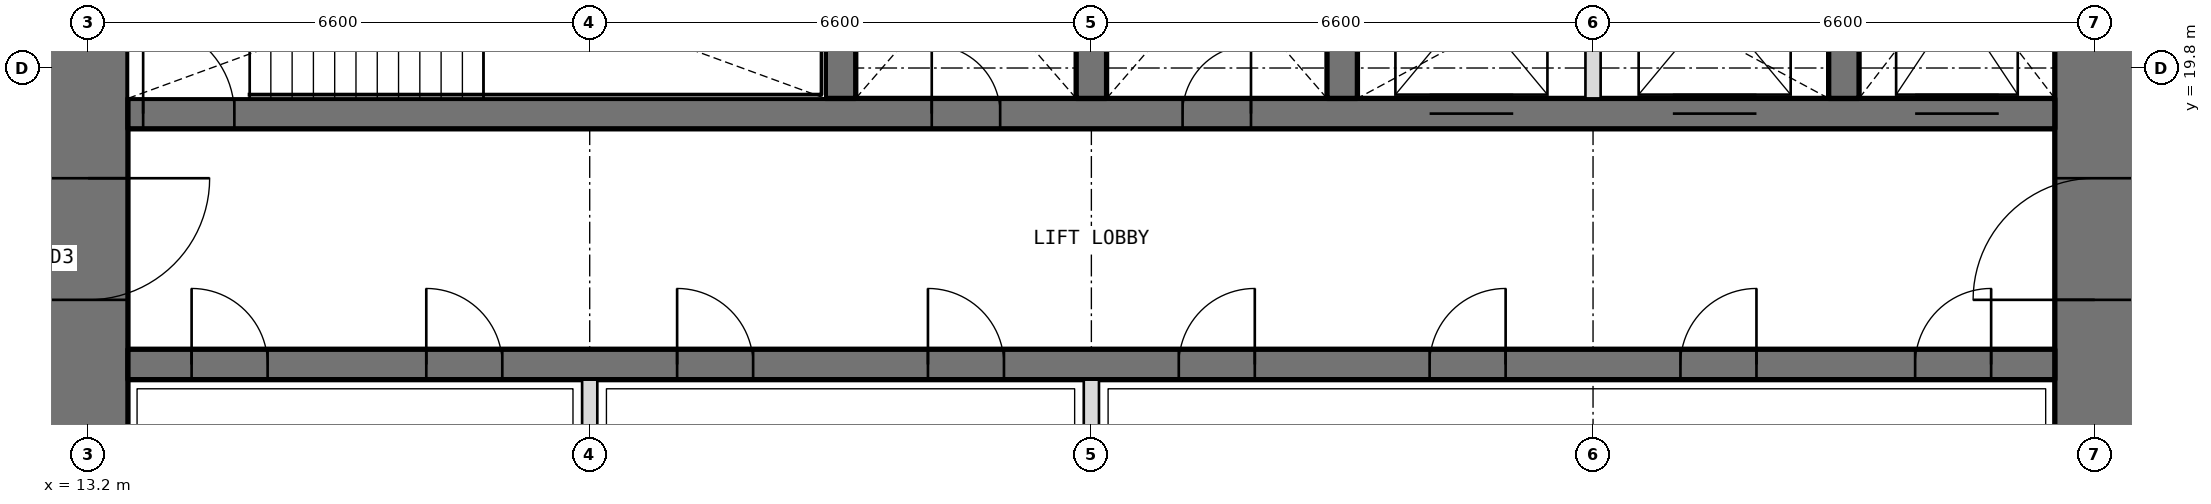
"""IFC4 building model, lengths in metres.
Left out: names, types, materials, properties, quantities, classifications, styles, units other than length and angle.
Written with IfcOpenShell. Run it as: python <this file> out.ifc"""

import sys

from ifc_helpers import new_model, si_unit, direction, frame, frame_2d, origin, place, context, subcontext, project, spatial, rectangle, extrude, element, fill, save


model = new_model("IFC4")
c1 = context("Model", 3, precision=1e-05, world=origin(), true_north=direction((0.0, 1.0)))
c2 = subcontext(c1, "Body", "Model", "MODEL_VIEW")
j1 = project(units=[si_unit("LENGTHUNIT", "METRE"), si_unit("PLANEANGLEUNIT", "RADIAN")], contexts=[c1])
p1 = place(None, origin())
s1 = spatial("IfcSite", under=j1, at=p1, CompositionType="ELEMENT")
p2 = place(p1, origin())
s2 = spatial("IfcBuilding", under=s1, at=p2, CompositionType="ELEMENT")
p3 = place(p2, frame((0.0, 0.0, 241.8)))
s3 = spatial("IfcBuildingStorey", under=s2, at=p3, CompositionType="ELEMENT", Elevation=241.8)
p4 = place(p3, frame((39.6, 13.725, 0.0), z_axis=(0.0, 0.0, 1.0), x_axis=(0.0, 1.0, 0.0)))
e1 = element("IfcWall", 1, at=p4, inside=s3, PredefinedType="SHEAR", context=c2, shape_type="SweptSolid", body=[
    extrude(rectangle(XDim=18.75, YDim=1.05, at=frame_2d((9.375, 0.0))), origin(), (0.0, 0.0, 1.0), 4.2),
])
p5 = place(p4, frame((3.025, 0.0, 0.0)))
e2 = element("IfcOpeningElement", 2, at=p5, cuts=e1, PredefinedType="OPENING", context=c2, shape_type="SweptSolid", body=[
    extrude(rectangle(XDim=1.6, YDim=2.1, at=frame_2d((0.8, 1.05))), frame((0.0, 0.535, 0.0), z_axis=(0.0, -1.0, 0.0), x_axis=(1.0, 0.0, 0.0)), (0.0, 0.0, 1.0), 1.07),
])
p6 = place(p4, frame((13.825, 0.0, 0.0)))
e3 = element("IfcOpeningElement", 3, at=p6, cuts=e1, PredefinedType="OPENING", context=c2, shape_type="SweptSolid", body=[
    extrude(rectangle(XDim=1.6, YDim=2.1, at=frame_2d((0.8, 1.05))), frame((0.0, 0.535, 0.0), z_axis=(0.0, -1.0, 0.0), x_axis=(1.0, 0.0, 0.0)), (0.0, 0.0, 1.0), 1.07),
])
p7 = place(p3, frame((13.2, 32.475, 0.0), z_axis=(0.0, 0.0, 1.0), x_axis=(0.0, -1.0, 0.0)))
e4 = element("IfcWall", 4, at=p7, inside=s3, PredefinedType="SHEAR", context=c2, shape_type="SweptSolid", body=[
    extrude(rectangle(XDim=18.75, YDim=1.05, at=frame_2d((9.375, 0.0))), origin(), (0.0, 0.0, 1.0), 4.2),
])
p8 = place(p7, frame((14.125, 0.0, 0.0)))
e5 = element("IfcOpeningElement", 5, at=p8, cuts=e4, PredefinedType="OPENING", context=c2, shape_type="SweptSolid", body=[
    extrude(rectangle(XDim=1.6, YDim=2.1, at=frame_2d((0.8, 1.05))), frame((0.0, 0.535, 0.0), z_axis=(0.0, -1.0, 0.0), x_axis=(1.0, 0.0, 0.0)), (0.0, 0.0, 1.0), 1.07),
])
p9 = place(p7, frame((3.325, 0.0, 0.0)))
e6 = element("IfcOpeningElement", 6, at=p9, cuts=e4, PredefinedType="OPENING", context=c2, shape_type="SweptSolid", body=[
    extrude(rectangle(XDim=1.6, YDim=2.1, at=frame_2d((0.8, 1.05))), frame((0.0, 0.535, 0.0), z_axis=(0.0, -1.0, 0.0), x_axis=(1.0, 0.0, 0.0)), (0.0, 0.0, 1.0), 1.07),
])
p10 = place(p3, frame((13.725, 15.9, 0.0), z_axis=(0.0, 0.0, 1.0), x_axis=(1.0, 0.0, 0.0)))
e7 = element("IfcWall", 7, at=p10, inside=s3, PredefinedType="SHEAR", context=c2, shape_type="SweptSolid", body=[
    extrude(rectangle(XDim=25.35, YDim=0.4, at=frame_2d((12.675, 0.0))), origin(), (0.0, 0.0, 1.0), 4.2),
])
p11 = place(p10, frame((0.837, 0.0, 0.0)))
e8 = element("IfcOpeningElement", 8, at=p11, cuts=e7, PredefinedType="OPENING", context=c2, shape_type="SweptSolid", body=[
    extrude(rectangle(XDim=1.0, YDim=2.1, at=frame_2d((0.5, 1.05))), frame((0.0, 0.21, 0.0), z_axis=(0.0, -1.0, 0.0), x_axis=(1.0, 0.0, 0.0)), (0.0, 0.0, 1.0), 0.42),
])
p12 = place(p10, frame((3.925, 0.0, 0.0)))
e9 = element("IfcOpeningElement", 9, at=p12, cuts=e7, PredefinedType="OPENING", context=c2, shape_type="SweptSolid", body=[
    extrude(rectangle(XDim=1.0, YDim=2.1, at=frame_2d((0.5, 1.05))), frame((0.0, 0.21, 0.0), z_axis=(0.0, -1.0, 0.0), x_axis=(1.0, 0.0, 0.0)), (0.0, 0.0, 1.0), 0.42),
])
p13 = place(p10, frame((7.225, 0.0, 0.0)))
e10 = element("IfcOpeningElement", 10, at=p13, cuts=e7, PredefinedType="OPENING", context=c2, shape_type="SweptSolid", body=[
    extrude(rectangle(XDim=1.0, YDim=2.1, at=frame_2d((0.5, 1.05))), frame((0.0, 0.21, 0.0), z_axis=(0.0, -1.0, 0.0), x_axis=(1.0, 0.0, 0.0)), (0.0, 0.0, 1.0), 0.42),
])
p14 = place(p10, frame((10.525, 0.0, 0.0)))
e11 = element("IfcOpeningElement", 11, at=p14, cuts=e7, PredefinedType="OPENING", context=c2, shape_type="SweptSolid", body=[
    extrude(rectangle(XDim=1.0, YDim=2.1, at=frame_2d((0.5, 1.05))), frame((0.0, 0.21, 0.0), z_axis=(0.0, -1.0, 0.0), x_axis=(1.0, 0.0, 0.0)), (0.0, 0.0, 1.0), 0.42),
])
p15 = place(p10, frame((13.825, 0.0, 0.0)))
e12 = element("IfcOpeningElement", 12, at=p15, cuts=e7, PredefinedType="OPENING", context=c2, shape_type="SweptSolid", body=[
    extrude(rectangle(XDim=1.0, YDim=2.1, at=frame_2d((0.5, 1.05))), frame((0.0, 0.21, 0.0), z_axis=(0.0, -1.0, 0.0), x_axis=(1.0, 0.0, 0.0)), (0.0, 0.0, 1.0), 0.42),
])
p16 = place(p10, frame((17.125, 0.0, 0.0)))
e13 = element("IfcOpeningElement", 13, at=p16, cuts=e7, PredefinedType="OPENING", context=c2, shape_type="SweptSolid", body=[
    extrude(rectangle(XDim=1.0, YDim=2.1, at=frame_2d((0.5, 1.05))), frame((0.0, 0.21, 0.0), z_axis=(0.0, -1.0, 0.0), x_axis=(1.0, 0.0, 0.0)), (0.0, 0.0, 1.0), 0.42),
])
p17 = place(p10, frame((20.425, 0.0, 0.0)))
e14 = element("IfcOpeningElement", 14, at=p17, cuts=e7, PredefinedType="OPENING", context=c2, shape_type="SweptSolid", body=[
    extrude(rectangle(XDim=1.0, YDim=2.1, at=frame_2d((0.5, 1.05))), frame((0.0, 0.21, 0.0), z_axis=(0.0, -1.0, 0.0), x_axis=(1.0, 0.0, 0.0)), (0.0, 0.0, 1.0), 0.42),
])
p18 = place(p10, frame((23.512, 0.0, 0.0)))
e15 = element("IfcOpeningElement", 15, at=p18, cuts=e7, PredefinedType="OPENING", context=c2, shape_type="SweptSolid", body=[
    extrude(rectangle(XDim=1.0, YDim=2.1, at=frame_2d((0.5, 1.05))), frame((0.0, 0.21, 0.0), z_axis=(0.0, -1.0, 0.0), x_axis=(1.0, 0.0, 0.0)), (0.0, 0.0, 1.0), 0.42),
])
p19 = place(p3, frame((13.725, 19.2, 0.0), z_axis=(0.0, 0.0, 1.0), x_axis=(1.0, 0.0, 0.0)))
e16 = element("IfcWall", 16, at=p19, inside=s3, PredefinedType="SHEAR", context=c2, shape_type="SweptSolid", body=[
    extrude(rectangle(XDim=25.35, YDim=0.4, at=frame_2d((12.675, 0.0))), origin(), (0.0, 0.0, 1.0), 4.2),
])
p20 = place(p19, frame((10.575, 0.0, 0.0)))
e17 = element("IfcOpeningElement", 17, at=p20, cuts=e16, PredefinedType="OPENING", context=c2, shape_type="SweptSolid", body=[
    extrude(rectangle(XDim=0.9, YDim=2.1, at=frame_2d((0.45, 1.05))), frame((0.0, 0.21, 0.0), z_axis=(0.0, -1.0, 0.0), x_axis=(1.0, 0.0, 0.0)), (0.0, 0.0, 1.0), 0.42),
])
p21 = place(p19, frame((13.875, 0.0, 0.0)))
e18 = element("IfcOpeningElement", 18, at=p21, cuts=e16, PredefinedType="OPENING", context=c2, shape_type="SweptSolid", body=[
    extrude(rectangle(XDim=0.9, YDim=2.1, at=frame_2d((0.45, 1.05))), frame((0.0, 0.21, 0.0), z_axis=(0.0, -1.0, 0.0), x_axis=(1.0, 0.0, 0.0)), (0.0, 0.0, 1.0), 0.42),
])
p22 = place(p19, frame((0.2, 0.0, 0.0)))
e19 = element("IfcOpeningElement", 19, at=p22, cuts=e16, PredefinedType="OPENING", context=c2, shape_type="SweptSolid", body=[
    extrude(rectangle(XDim=1.2, YDim=2.1, at=frame_2d((0.6, 1.05))), frame((0.0, 0.21, 0.0), z_axis=(0.0, -1.0, 0.0), x_axis=(1.0, 0.0, 0.0)), (0.0, 0.0, 1.0), 0.42),
])
p23 = place(p19, frame((23.512, 0.0, 0.0)))
e20 = element("IfcOpeningElement", 20, at=p23, cuts=e16, PredefinedType="OPENING", context=c2, shape_type="SweptSolid", body=[
    extrude(rectangle(XDim=1.1, YDim=2.1, at=frame_2d((0.55, 1.05))), frame((0.0, 0.21, 0.0), z_axis=(0.0, -1.0, 0.0), x_axis=(1.0, 0.0, 0.0)), (0.0, 0.0, 1.0), 0.42),
])
p24 = place(p19, frame((17.125, 0.0, 0.0)))
e21 = element("IfcOpeningElement", 21, at=p24, cuts=e16, PredefinedType="OPENING", context=c2, shape_type="SweptSolid", body=[
    extrude(rectangle(XDim=1.1, YDim=2.1, at=frame_2d((0.55, 1.05))), frame((0.0, 0.21, 0.0), z_axis=(0.0, -1.0, 0.0), x_axis=(1.0, 0.0, 0.0)), (0.0, 0.0, 1.0), 0.42),
])
p25 = place(p19, frame((20.325, 0.0, 0.0)))
e22 = element("IfcOpeningElement", 22, at=p25, cuts=e16, PredefinedType="OPENING", context=c2, shape_type="SweptSolid", body=[
    extrude(rectangle(XDim=1.1, YDim=2.1, at=frame_2d((0.55, 1.05))), frame((0.0, 0.21, 0.0), z_axis=(0.0, -1.0, 0.0), x_axis=(1.0, 0.0, 0.0)), (0.0, 0.0, 1.0), 0.42),
])
for number, where, z_axis, x_axis in (
    (23, (23.1, 19.4, 0.0), (0.0, 0.0, 1.0), (0.0, 1.0, 0.0)),
    (24, (26.4, 19.4, 0.0), (0.0, 0.0, 1.0), (0.0, 1.0, 0.0)),
    (25, (29.7, 19.4, 0.0), (0.0, 0.0, 1.0), (0.0, 1.0, 0.0)),
    (26, (36.3, 19.4, 0.0), (0.0, 0.0, 1.0), (0.0, 1.0, 0.0)),
):
    element("IfcWall", number, at=place(p3, frame(where, z_axis=z_axis, x_axis=x_axis)), inside=s3, PredefinedType="SHEAR", context=c2, shape_type="SweptSolid", body=[
        extrude(rectangle(XDim=3.35, YDim=0.4, at=frame_2d((1.675, 0.0))), origin(), (0.0, 0.0, 1.0), 4.2),
    ])
for number, where, z_axis, x_axis in (
    (27, (19.8, 13.725, 0.0), (0.0, 0.0, 1.0), (0.0, 1.0, 0.0)),
    (28, (26.4, 13.725, 0.0), (0.0, 0.0, 1.0), (0.0, 1.0, 0.0)),
):
    element("IfcWall", number, at=place(p3, frame(where, z_axis=z_axis, x_axis=x_axis)), inside=s3, PredefinedType="PARTITIONING", context=c2, shape_type="SweptSolid", body=[
        extrude(rectangle(XDim=1.975, YDim=0.2, at=frame_2d((0.987, 0.0))), origin(), (0.0, 0.0, 1.0), 4.2),
    ])
p26 = place(p3, frame((33.0, 19.4, 0.0), z_axis=(0.0, 0.0, 1.0), x_axis=(0.0, 1.0, 0.0)))
e29 = element("IfcWall", 29, at=p26, inside=s3, PredefinedType="PARTITIONING", context=c2, shape_type="SweptSolid", body=[
    extrude(rectangle(XDim=3.35, YDim=0.2, at=frame_2d((1.675, 0.0))), origin(), (0.0, 0.0, 1.0), 4.2),
])
p27 = place(p20, origin())
e30 = element("IfcDoor", 30, at=p27, inside=s3, OperationType="SINGLE_SWING_LEFT", PredefinedType="DOOR", context=c2, shape_type="SweptSolid", body=[
    extrude(rectangle(XDim=0.9, YDim=2.1, at=frame_2d((0.45, 1.05))), frame((0.0, 0.025, 0.0), z_axis=(0.0, -1.0, 0.0), x_axis=(1.0, 0.0, 0.0)), (0.0, 0.0, 1.0), 0.05),
])
fill(e17, e30)
p28 = place(p21, origin())
e31 = element("IfcDoor", 31, at=p28, inside=s3, OperationType="SINGLE_SWING_RIGHT", PredefinedType="DOOR", context=c2, shape_type="SweptSolid", body=[
    extrude(rectangle(XDim=0.9, YDim=2.1, at=frame_2d((0.45, 1.05))), frame((0.0, 0.025, 0.0), z_axis=(0.0, -1.0, 0.0), x_axis=(1.0, 0.0, 0.0)), (0.0, 0.0, 1.0), 0.05),
])
fill(e18, e31)
p29 = place(p11, origin())
e32 = element("IfcDoor", 32, at=p29, inside=s3, OperationType="SINGLE_SWING_LEFT", PredefinedType="DOOR", context=c2, shape_type="SweptSolid", body=[
    extrude(rectangle(XDim=1.0, YDim=2.1, at=frame_2d((0.5, 1.05))), frame((0.0, 0.025, 0.0), z_axis=(0.0, -1.0, 0.0), x_axis=(1.0, 0.0, 0.0)), (0.0, 0.0, 1.0), 0.05),
])
fill(e8, e32)
p30 = place(p12, origin())
e33 = element("IfcDoor", 33, at=p30, inside=s3, OperationType="SINGLE_SWING_LEFT", PredefinedType="DOOR", context=c2, shape_type="SweptSolid", body=[
    extrude(rectangle(XDim=1.0, YDim=2.1, at=frame_2d((0.5, 1.05))), frame((0.0, 0.025, 0.0), z_axis=(0.0, -1.0, 0.0), x_axis=(1.0, 0.0, 0.0)), (0.0, 0.0, 1.0), 0.05),
])
fill(e9, e33)
p31 = place(p13, origin())
e34 = element("IfcDoor", 34, at=p31, inside=s3, OperationType="SINGLE_SWING_LEFT", PredefinedType="DOOR", context=c2, shape_type="SweptSolid", body=[
    extrude(rectangle(XDim=1.0, YDim=2.1, at=frame_2d((0.5, 1.05))), frame((0.0, 0.025, 0.0), z_axis=(0.0, -1.0, 0.0), x_axis=(1.0, 0.0, 0.0)), (0.0, 0.0, 1.0), 0.05),
])
fill(e10, e34)
p32 = place(p14, origin())
e35 = element("IfcDoor", 35, at=p32, inside=s3, OperationType="SINGLE_SWING_LEFT", PredefinedType="DOOR", context=c2, shape_type="SweptSolid", body=[
    extrude(rectangle(XDim=1.0, YDim=2.1, at=frame_2d((0.5, 1.05))), frame((0.0, 0.025, 0.0), z_axis=(0.0, -1.0, 0.0), x_axis=(1.0, 0.0, 0.0)), (0.0, 0.0, 1.0), 0.05),
])
fill(e11, e35)
p33 = place(p15, origin())
e36 = element("IfcDoor", 36, at=p33, inside=s3, OperationType="SINGLE_SWING_RIGHT", PredefinedType="DOOR", context=c2, shape_type="SweptSolid", body=[
    extrude(rectangle(XDim=1.0, YDim=2.1, at=frame_2d((0.5, 1.05))), frame((0.0, 0.025, 0.0), z_axis=(0.0, -1.0, 0.0), x_axis=(1.0, 0.0, 0.0)), (0.0, 0.0, 1.0), 0.05),
])
fill(e12, e36)
p34 = place(p16, origin())
e37 = element("IfcDoor", 37, at=p34, inside=s3, OperationType="SINGLE_SWING_RIGHT", PredefinedType="DOOR", context=c2, shape_type="SweptSolid", body=[
    extrude(rectangle(XDim=1.0, YDim=2.1, at=frame_2d((0.5, 1.05))), frame((0.0, 0.025, 0.0), z_axis=(0.0, -1.0, 0.0), x_axis=(1.0, 0.0, 0.0)), (0.0, 0.0, 1.0), 0.05),
])
fill(e13, e37)
p35 = place(p17, origin())
e38 = element("IfcDoor", 38, at=p35, inside=s3, OperationType="SINGLE_SWING_RIGHT", PredefinedType="DOOR", context=c2, shape_type="SweptSolid", body=[
    extrude(rectangle(XDim=1.0, YDim=2.1, at=frame_2d((0.5, 1.05))), frame((0.0, 0.025, 0.0), z_axis=(0.0, -1.0, 0.0), x_axis=(1.0, 0.0, 0.0)), (0.0, 0.0, 1.0), 0.05),
])
fill(e14, e38)
p36 = place(p18, origin())
e39 = element("IfcDoor", 39, at=p36, inside=s3, OperationType="SINGLE_SWING_RIGHT", PredefinedType="DOOR", context=c2, shape_type="SweptSolid", body=[
    extrude(rectangle(XDim=1.0, YDim=2.1, at=frame_2d((0.5, 1.05))), frame((0.0, 0.025, 0.0), z_axis=(0.0, -1.0, 0.0), x_axis=(1.0, 0.0, 0.0)), (0.0, 0.0, 1.0), 0.05),
])
fill(e15, e39)
p37 = place(p22, origin())
e40 = element("IfcDoor", 40, at=p37, inside=s3, OperationType="SINGLE_SWING_LEFT", PredefinedType="DOOR", context=c2, shape_type="SweptSolid", body=[
    extrude(rectangle(XDim=1.2, YDim=2.1, at=frame_2d((0.6, 1.05))), frame((0.0, 0.025, 0.0), z_axis=(0.0, -1.0, 0.0), x_axis=(1.0, 0.0, 0.0)), (0.0, 0.0, 1.0), 0.05),
])
fill(e19, e40)
p38 = place(p8, origin())
e41 = element("IfcDoor", 41, at=p38, inside=s3, OperationType="DOUBLE_DOOR_DOUBLE_SWING", PredefinedType="DOOR", context=c2, shape_type="SweptSolid", body=[
    extrude(rectangle(XDim=1.6, YDim=2.1, at=frame_2d((0.8, 1.05))), frame((0.0, 0.025, 0.0), z_axis=(0.0, -1.0, 0.0), x_axis=(1.0, 0.0, 0.0)), (0.0, 0.0, 1.0), 0.05),
])
fill(e5, e41)
p39 = place(p5, origin())
e42 = element("IfcDoor", 42, at=p39, inside=s3, OperationType="DOUBLE_DOOR_DOUBLE_SWING", PredefinedType="DOOR", context=c2, shape_type="SweptSolid", body=[
    extrude(rectangle(XDim=1.6, YDim=2.1, at=frame_2d((0.8, 1.05))), frame((0.0, 0.025, 0.0), z_axis=(0.0, -1.0, 0.0), x_axis=(1.0, 0.0, 0.0)), (0.0, 0.0, 1.0), 0.05),
])
fill(e2, e42)
p40 = place(p23, origin())
e43 = element("IfcDoor", 43, at=p40, inside=s3, OperationType="DOUBLE_DOOR_SLIDING", PredefinedType="DOOR", context=c2, shape_type="SweptSolid", body=[
    extrude(rectangle(XDim=1.1, YDim=2.1, at=frame_2d((0.55, 1.05))), frame((0.0, 0.025, 0.0), z_axis=(0.0, -1.0, 0.0), x_axis=(1.0, 0.0, 0.0)), (0.0, 0.0, 1.0), 0.05),
])
fill(e20, e43)
p41 = place(p24, origin())
e44 = element("IfcDoor", 44, at=p41, inside=s3, OperationType="DOUBLE_DOOR_SLIDING", PredefinedType="DOOR", context=c2, shape_type="SweptSolid", body=[
    extrude(rectangle(XDim=1.1, YDim=2.1, at=frame_2d((0.55, 1.05))), frame((0.0, 0.025, 0.0), z_axis=(0.0, -1.0, 0.0), x_axis=(1.0, 0.0, 0.0)), (0.0, 0.0, 1.0), 0.05),
])
fill(e21, e44)
p42 = place(p25, origin())
e45 = element("IfcDoor", 45, at=p42, inside=s3, OperationType="DOUBLE_DOOR_SLIDING", PredefinedType="DOOR", context=c2, shape_type="SweptSolid", body=[
    extrude(rectangle(XDim=1.1, YDim=2.1, at=frame_2d((0.55, 1.05))), frame((0.0, 0.025, 0.0), z_axis=(0.0, -1.0, 0.0), x_axis=(1.0, 0.0, 0.0)), (0.0, 0.0, 1.0), 0.05),
])
fill(e22, e45)
save(model, sys.argv[1])
